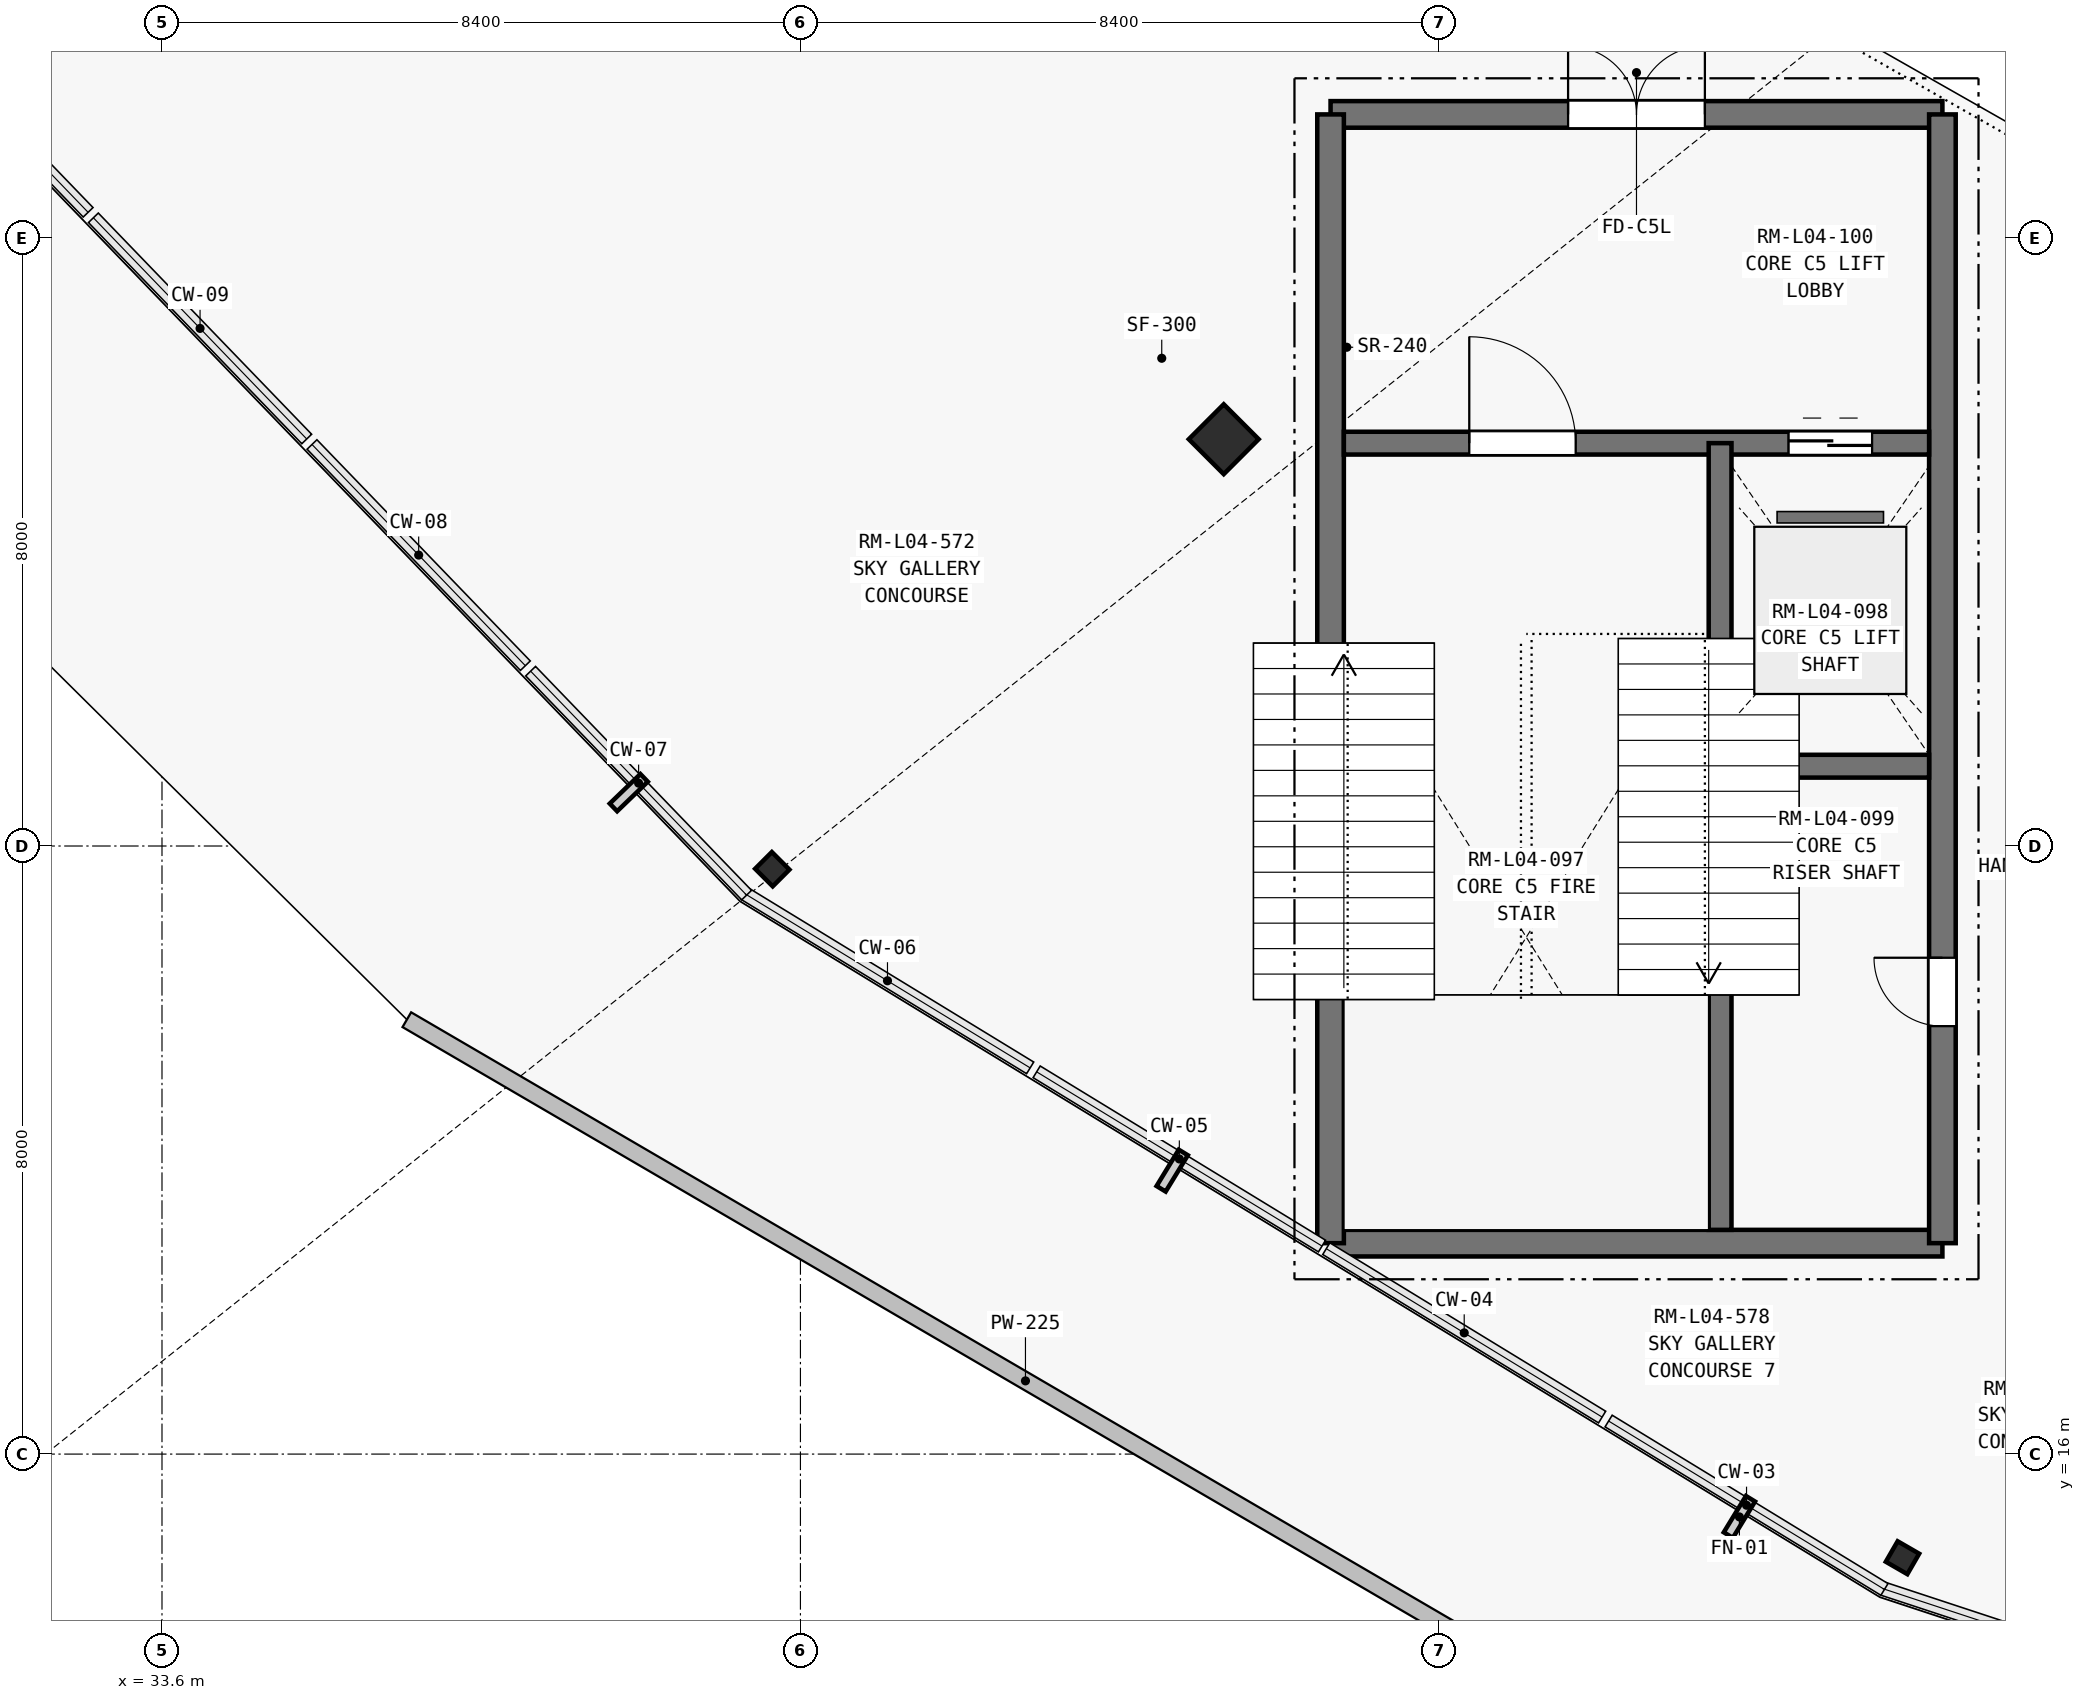
"""IFC4 building model, lengths in metres.
Left out: names, types, materials, properties, quantities, classifications, styles, units other than length and angle.
Written with IfcOpenShell. Run it as: python <this file> out.ifc"""

import sys

from ifc_helpers import new_model, si_unit, direction, frame, frame_2d, origin, origin_2d, place, context, subcontext, project, spatial, rectangle, i_section, extrude, element, fill, save


model = new_model("IFC4")
c1 = context("Model", 3, precision=1e-05, world=origin(), true_north=direction((0.0, 1.0)))
c2 = subcontext(c1, "Body", "Model", "MODEL_VIEW")
j1 = project(units=[si_unit("LENGTHUNIT", "METRE"), si_unit("PLANEANGLEUNIT", "RADIAN")], contexts=[c1])
p1 = place(None, origin())
s1 = spatial("IfcSite", under=j1, at=p1, CompositionType="ELEMENT")
p2 = place(p1, origin())
s2 = spatial("IfcBuilding", under=s1, at=p2, CompositionType="ELEMENT")
p3 = place(p2, frame((0.0, 0.0, 18.9)))
s3 = spatial("IfcBuildingStorey", under=s2, at=p3, CompositionType="ELEMENT", Elevation=18.9)
p4 = place(p3, frame((47.569, 29.352, 0.0), z_axis=(0.0, 0.0, 1.0), x_axis=(-0.707106781187, -0.707106781187, 0.0)))
e1 = element("IfcColumn", 1, at=p4, inside=s3, PredefinedType="COLUMN", context=c2, shape_type="SweptSolid", body=[
    extrude(rectangle(XDim=0.65, YDim=0.65, at=origin_2d()), origin(), (0.0, 0.0, 1.0), 4.5),
])
for number, where, z_axis, x_axis in (
    (2, (41.63, 23.695, 0.0), (0.0, 0.0, 1.0), (-0.707, -0.707, 0.0)),
    (3, (56.5, 14.637, 0.0), (0.0, 0.0, 1.0), (-0.5, -0.866, 0.0)),
):
    element("IfcColumn", number, at=place(p3, frame(where, z_axis=z_axis, x_axis=x_axis)), inside=s3, PredefinedType="COLUMN", context=c2, shape_type="SweptSolid", body=[
        extrude(i_section(OverallWidth=0.311, OverallDepth=0.327, WebThickness=0.016, FlangeThickness=0.025, at=origin_2d()), origin(), (0.0, 0.0, 1.0), 4.5),
    ])
p5 = place(p3, frame((53.1, 12.212, 0.0), z_axis=(0.0, 0.0, 1.0), x_axis=(-0.863606919147, 0.504165735846, 0.0)))
e4 = element("IfcWall", 4, at=p5, inside=s3, PredefinedType="PARAPET", context=c2, shape_type="SweptSolid", body=[
    extrude(rectangle(XDim=18.85, YDim=0.225, at=frame_2d((9.425, 0.0))), origin(), (0.0, 0.0, 1.0), 0.95),
])
p6 = place(p3, frame((48.975, 18.775, 0.0), z_axis=(0.0, 0.0, 1.0), x_axis=(1.0, 0.0, 0.0)))
e5 = element("IfcWall", 5, at=p6, inside=s3, PredefinedType="SHEAR", context=c2, shape_type="SweptSolid", body=[
    extrude(rectangle(XDim=8.05, YDim=0.35, at=frame_2d((4.025, 0.0))), origin(), (0.0, 0.0, 1.0), 4.5),
])
p7 = place(p3, frame((48.975, 33.625, 0.0), z_axis=(0.0, 0.0, 1.0), x_axis=(1.0, 0.0, 0.0)))
e6 = element("IfcWall", 6, at=p7, inside=s3, PredefinedType="SHEAR", context=c2, shape_type="SweptSolid", body=[
    extrude(rectangle(XDim=8.05, YDim=0.35, at=frame_2d((4.025, 0.0))), origin(), (0.0, 0.0, 1.0), 4.5),
])
p8 = place(p7, frame((3.125, 0.0, 0.0)))
e7 = element("IfcOpeningElement", 7, at=p8, cuts=e6, PredefinedType="OPENING", context=c2, shape_type="SweptSolid", body=[
    extrude(rectangle(XDim=1.8, YDim=2.25, at=frame_2d((0.9, 1.125))), frame((0.0, 0.185, 0.0), z_axis=(0.0, -1.0, 0.0), x_axis=(1.0, 0.0, 0.0)), (0.0, 0.0, 1.0), 0.37),
])
p9 = place(p3, frame((48.975, 18.775, 0.0), z_axis=(0.0, 0.0, 1.0), x_axis=(0.0, 1.0, 0.0)))
e8 = element("IfcWall", 8, at=p9, inside=s3, PredefinedType="SHEAR", context=c2, shape_type="SweptSolid", body=[
    extrude(rectangle(XDim=14.85, YDim=0.35, at=frame_2d((7.425, 0.0))), origin(), (0.0, 0.0, 1.0), 4.5),
])
p10 = place(p3, frame((57.025, 18.775, 0.0), z_axis=(0.0, 0.0, 1.0), x_axis=(0.0, 1.0, 0.0)))
e9 = element("IfcWall", 9, at=p10, inside=s3, PredefinedType="SHEAR", context=c2, shape_type="SweptSolid", body=[
    extrude(rectangle(XDim=14.85, YDim=0.35, at=frame_2d((7.425, 0.0))), origin(), (0.0, 0.0, 1.0), 4.5),
])
p11 = place(p10, frame((2.855, 0.0, 0.0)))
e10 = element("IfcOpeningElement", 10, at=p11, cuts=e9, PredefinedType="OPENING", context=c2, shape_type="SweptSolid", body=[
    extrude(rectangle(XDim=0.9, YDim=2.1, at=frame_2d((0.45, 1.05))), frame((0.0, 0.185, 0.0), z_axis=(0.0, -1.0, 0.0), x_axis=(1.0, 0.0, 0.0)), (0.0, 0.0, 1.0), 0.37),
])
p12 = place(p3, frame((49.15, 29.3, 0.0), z_axis=(0.0, 0.0, 1.0), x_axis=(1.0, 0.0, 0.0)))
e11 = element("IfcWall", 11, at=p12, inside=s3, PredefinedType="SHEAR", context=c2, shape_type="SweptSolid", body=[
    extrude(rectangle(XDim=7.7, YDim=0.3, at=frame_2d((3.85, 0.0))), origin(), (0.0, 0.0, 1.0), 4.5),
])
p13 = place(p12, frame((1.65, 0.0, 0.0)))
e12 = element("IfcOpeningElement", 12, at=p13, cuts=e11, PredefinedType="OPENING", context=c2, shape_type="SweptSolid", body=[
    extrude(rectangle(XDim=1.4, YDim=2.2, at=frame_2d((0.7, 1.1))), frame((0.0, 0.16, 0.0), z_axis=(0.0, -1.0, 0.0), x_axis=(1.0, 0.0, 0.0)), (0.0, 0.0, 1.0), 0.32),
])
p14 = place(p12, frame((5.85, 0.0, 0.0)))
e13 = element("IfcOpeningElement", 13, at=p14, cuts=e11, PredefinedType="OPENING", context=c2, shape_type="SweptSolid", body=[
    extrude(rectangle(XDim=1.1, YDim=2.2, at=frame_2d((0.55, 1.1))), frame((0.0, 0.16, 0.0), z_axis=(0.0, -1.0, 0.0), x_axis=(1.0, 0.0, 0.0)), (0.0, 0.0, 1.0), 0.32),
])
p15 = place(p3, frame((54.1, 18.95, 0.0), z_axis=(0.0, 0.0, 1.0), x_axis=(0.0, 1.0, 0.0)))
e14 = element("IfcWall", 14, at=p15, inside=s3, PredefinedType="SHEAR", context=c2, shape_type="SweptSolid", body=[
    extrude(rectangle(XDim=10.35, YDim=0.3, at=frame_2d((5.175, 0.0))), origin(), (0.0, 0.0, 1.0), 4.5),
])
p16 = place(p3, frame((54.25, 25.05, 0.0), z_axis=(0.0, 0.0, 1.0), x_axis=(1.0, 0.0, 0.0)))
e15 = element("IfcWall", 15, at=p16, inside=s3, PredefinedType="SHEAR", context=c2, shape_type="SweptSolid", body=[
    extrude(rectangle(XDim=2.6, YDim=0.3, at=frame_2d((1.3, 0.0))), origin(), (0.0, 0.0, 1.0), 4.5),
])
p17 = place(p8, origin())
e16 = element("IfcDoor", 16, at=p17, inside=s3, OperationType="DOUBLE_DOOR_SINGLE_SWING", PredefinedType="DOOR", context=c2, shape_type="SweptSolid", body=[
    extrude(rectangle(XDim=1.8, YDim=2.25, at=frame_2d((0.9, 1.125))), frame((0.0, 0.025, 0.0), z_axis=(0.0, -1.0, 0.0), x_axis=(1.0, 0.0, 0.0)), (0.0, 0.0, 1.0), 0.05),
])
fill(e7, e16)
p18 = place(p13, origin())
e17 = element("IfcDoor", 17, at=p18, inside=s3, OperationType="SINGLE_SWING_LEFT", PredefinedType="DOOR", context=c2, shape_type="SweptSolid", body=[
    extrude(rectangle(XDim=1.4, YDim=2.2, at=frame_2d((0.7, 1.1))), frame((0.0, 0.025, 0.0), z_axis=(0.0, -1.0, 0.0), x_axis=(1.0, 0.0, 0.0)), (0.0, 0.0, 1.0), 0.05),
])
fill(e12, e17)
p19 = place(p11, origin())
e18 = element("IfcDoor", 18, at=p19, inside=s3, OperationType="SINGLE_SWING_RIGHT", PredefinedType="DOOR", context=c2, shape_type="SweptSolid", body=[
    extrude(rectangle(XDim=0.9, YDim=2.1, at=frame_2d((0.45, 1.05))), frame((0.0, 0.025, 0.0), z_axis=(0.0, -1.0, 0.0), x_axis=(1.0, 0.0, 0.0)), (0.0, 0.0, 1.0), 0.05),
])
fill(e10, e18)
p20 = place(p14, origin())
e19 = element("IfcDoor", 19, at=p20, inside=s3, OperationType="SLIDING_TO_LEFT", PredefinedType="DOOR", context=c2, shape_type="SweptSolid", body=[
    extrude(rectangle(XDim=1.1, YDim=2.2, at=frame_2d((0.55, 1.1))), frame((0.0, 0.025, 0.0), z_axis=(0.0, -1.0, 0.0), x_axis=(1.0, 0.0, 0.0)), (0.0, 0.0, 1.0), 0.05),
])
fill(e13, e19)
save(model, sys.argv[1])
